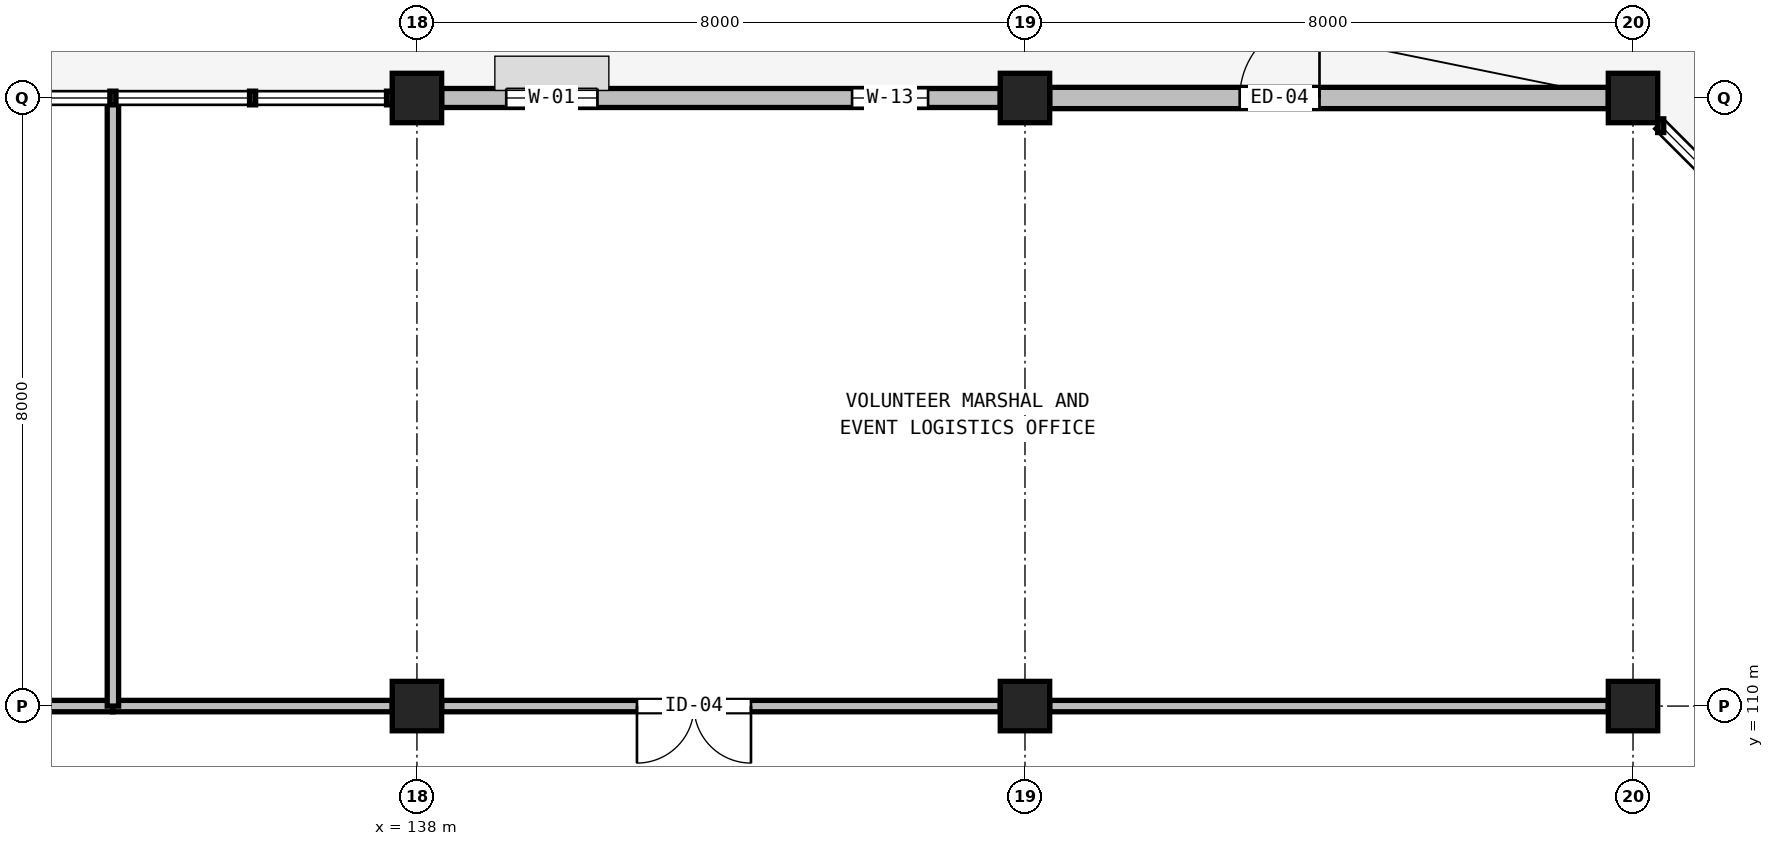
"""IFC4 building model, lengths in metres.
Left out: names, types, materials, properties, quantities, classifications, styles, units other than length and angle.
Written with IfcOpenShell. Run it as: python <this file> out.ifc"""

import sys

from ifc_helpers import new_model, si_unit, direction, frame, frame_2d, origin, origin_2d, place, context, subcontext, project, spatial, rectangle, circle, extrude, element, fill, save


model = new_model("IFC4")
c1 = context("Model", 3, precision=1e-05, world=origin(), true_north=direction((0.0, 1.0)))
c2 = subcontext(c1, "Body", "Model", "MODEL_VIEW")
j1 = project(units=[si_unit("LENGTHUNIT", "METRE"), si_unit("PLANEANGLEUNIT", "RADIAN")], contexts=[c1])
p1 = place(None, origin())
s1 = spatial("IfcSite", under=j1, at=p1, CompositionType="ELEMENT")
p2 = place(p1, origin())
s2 = spatial("IfcBuilding", under=s1, at=p2, CompositionType="ELEMENT")
p3 = place(p2, origin())
s3 = spatial("IfcBuildingStorey", under=s2, at=p3, CompositionType="ELEMENT", Elevation=0.0)
for number, where, z_axis, x_axis in (
    (1, (138.0, 110.0, 0.0), (0.0, 0.0, 1.0), (1.0, 0.0, 0.0)),
    (2, (138.0, 118.0, 0.0), (0.0, 0.0, 1.0), (1.0, 0.0, 0.0)),
    (3, (146.0, 110.0, 0.0), (0.0, 0.0, 1.0), (1.0, 0.0, 0.0)),
    (4, (146.0, 118.0, 0.0), (0.0, 0.0, 1.0), (1.0, 0.0, 0.0)),
    (5, (154.0, 110.0, 0.0), (0.0, 0.0, 1.0), (1.0, 0.0, 0.0)),
    (6, (154.0, 118.0, 0.0), (0.0, 0.0, 1.0), (1.0, 0.0, 0.0)),
):
    element("IfcColumn", number, at=place(p3, frame(where, z_axis=z_axis, x_axis=x_axis)), inside=s3, PredefinedType="COLUMN", context=c2, shape_type="SweptSolid", body=[
        extrude(circle(Radius=0.325, at=origin_2d()), origin(), (0.0, 0.0, 1.0), 5.4),
    ])
p4 = place(p3, frame((138.325, 118.0, 0.0), z_axis=(0.0, 0.0, 1.0), x_axis=(1.0, 0.0, 0.0)))
e7 = element("IfcWall", 7, at=p4, inside=s3, PredefinedType="SOLIDWALL", context=c2, shape_type="SweptSolid", body=[
    extrude(rectangle(XDim=7.35, YDim=0.25, at=frame_2d((3.675, 0.0))), origin(), (0.0, 0.0, 1.0), 4.24),
])
p5 = place(p4, frame((0.85, 0.0, 0.9)))
e8 = element("IfcOpeningElement", 8, at=p5, cuts=e7, PredefinedType="OPENING", context=c2, shape_type="SweptSolid", body=[
    extrude(rectangle(XDim=1.2, YDim=1.8, at=frame_2d((0.6, 0.9))), frame((0.0, 0.135, 0.0), z_axis=(0.0, -1.0, 0.0), x_axis=(1.0, 0.0, 0.0)), (0.0, 0.0, 1.0), 0.27),
])
p6 = place(p4, frame((5.4, 0.0, 0.9)))
e9 = element("IfcOpeningElement", 9, at=p6, cuts=e7, PredefinedType="OPENING", context=c2, shape_type="SweptSolid", body=[
    extrude(rectangle(XDim=1.0, YDim=2.1, at=frame_2d((0.5, 1.05))), frame((0.0, 0.135, 0.0), z_axis=(0.0, -1.0, 0.0), x_axis=(1.0, 0.0, 0.0)), (0.0, 0.0, 1.0), 0.27),
])
p7 = place(p3, frame((146.325, 118.0, 0.0), z_axis=(0.0, 0.0, 1.0), x_axis=(1.0, 0.0, 0.0)))
e10 = element("IfcWall", 10, at=p7, inside=s3, PredefinedType="SOLIDWALL", context=c2, shape_type="SweptSolid", body=[
    extrude(rectangle(XDim=7.35, YDim=0.28, at=frame_2d((3.675, 0.0))), origin(), (0.0, 0.0, 1.0), 4.24),
])
p8 = place(p7, frame((2.5, 0.0, 0.0)))
e11 = element("IfcOpeningElement", 11, at=p8, cuts=e10, PredefinedType="OPENING", context=c2, shape_type="SweptSolid", body=[
    extrude(rectangle(XDim=1.05, YDim=2.2, at=frame_2d((0.525, 1.1))), frame((0.0, 0.15, 0.0), z_axis=(0.0, -1.0, 0.0), x_axis=(1.0, 0.0, 0.0)), (0.0, 0.0, 1.0), 0.3),
])
for number, where, z_axis, x_axis in (
    (12, (130.325, 110.0, 0.0), (0.0, 0.0, 1.0), (1.0, 0.0, 0.0)),
    (13, (134.0, 110.0, 0.0), (0.0, 0.0, 1.0), (1.0, 0.0, 0.0)),
):
    element("IfcWall", number, at=place(p3, frame(where, z_axis=z_axis, x_axis=x_axis)), inside=s3, PredefinedType="PARTITIONING", context=c2, shape_type="SweptSolid", body=[
        extrude(rectangle(XDim=3.675, YDim=0.15, at=frame_2d((1.837, 0.0))), origin(), (0.0, 0.0, 1.0), 4.44),
    ])
p9 = place(p3, frame((138.325, 110.0, 0.0), z_axis=(0.0, 0.0, 1.0), x_axis=(1.0, 0.0, 0.0)))
e14 = element("IfcWall", 14, at=p9, inside=s3, PredefinedType="PARTITIONING", context=c2, shape_type="SweptSolid", body=[
    extrude(rectangle(XDim=7.35, YDim=0.15, at=frame_2d((3.675, 0.0))), origin(), (0.0, 0.0, 1.0), 4.39),
])
p10 = place(p9, frame((2.57, 0.0, 0.0)))
e15 = element("IfcOpeningElement", 15, at=p10, cuts=e14, PredefinedType="OPENING", context=c2, shape_type="SweptSolid", body=[
    extrude(rectangle(XDim=1.5, YDim=2.2, at=frame_2d((0.75, 1.1))), frame((0.0, 0.085, 0.0), z_axis=(0.0, -1.0, 0.0), x_axis=(1.0, 0.0, 0.0)), (0.0, 0.0, 1.0), 0.17),
])
p11 = place(p3, frame((146.325, 110.0, 0.0), z_axis=(0.0, 0.0, 1.0), x_axis=(1.0, 0.0, 0.0)))
e16 = element("IfcWall", 16, at=p11, inside=s3, PredefinedType="PARTITIONING", context=c2, shape_type="SweptSolid", body=[
    extrude(rectangle(XDim=7.35, YDim=0.15, at=frame_2d((3.675, 0.0))), origin(), (0.0, 0.0, 1.0), 4.34),
])
p12 = place(p3, frame((134.0, 110.0, 0.0), z_axis=(0.0, 0.0, 1.0), x_axis=(0.0, 1.0, 0.0)))
e17 = element("IfcWall", 17, at=p12, inside=s3, PredefinedType="PARTITIONING", context=c2, shape_type="SweptSolid", body=[
    extrude(rectangle(XDim=8.0, YDim=0.15, at=frame_2d((4.0, 0.0))), origin(), (0.0, 0.0, 1.0), 5.1),
])
p13 = place(p5, origin())
e18 = element("IfcWindow", 18, at=p13, inside=s3, PartitioningType="SINGLE_PANEL", PredefinedType="WINDOW", context=c2, shape_type="SweptSolid", body=[
    extrude(rectangle(XDim=1.2, YDim=1.8, at=frame_2d((0.6, 0.9))), frame((0.0, 0.03, 0.0), z_axis=(0.0, -1.0, 0.0), x_axis=(1.0, 0.0, 0.0)), (0.0, 0.0, 1.0), 0.06),
])
fill(e8, e18)
p14 = place(p6, origin())
e19 = element("IfcWindow", 19, at=p14, inside=s3, PartitioningType="SINGLE_PANEL", PredefinedType="WINDOW", context=c2, shape_type="SweptSolid", body=[
    extrude(rectangle(XDim=1.0, YDim=2.1, at=frame_2d((0.5, 1.05))), frame((0.0, 0.03, 0.0), z_axis=(0.0, -1.0, 0.0), x_axis=(1.0, 0.0, 0.0)), (0.0, 0.0, 1.0), 0.06),
])
fill(e9, e19)
p15 = place(p8, origin())
e20 = element("IfcDoor", 20, at=p15, inside=s3, OperationType="SINGLE_SWING_RIGHT", PredefinedType="DOOR", context=c2, shape_type="SweptSolid", body=[
    extrude(rectangle(XDim=1.05, YDim=2.2, at=frame_2d((0.525, 1.1))), frame((0.0, 0.025, 0.0), z_axis=(0.0, -1.0, 0.0), x_axis=(1.0, 0.0, 0.0)), (0.0, 0.0, 1.0), 0.05),
])
fill(e11, e20)
p16 = place(p10, frame((1.5, 0.0, 0.0), z_axis=(0.0, 0.0, 1.0), x_axis=(-1.0, 0.0, 0.0)))
e21 = element("IfcDoor", 21, at=p16, inside=s3, OperationType="DOUBLE_DOOR_SINGLE_SWING", PredefinedType="DOOR", context=c2, shape_type="SweptSolid", body=[
    extrude(rectangle(XDim=1.5, YDim=2.2, at=frame_2d((0.75, 1.1))), frame((0.0, 0.025, 0.0), z_axis=(0.0, -1.0, 0.0), x_axis=(1.0, 0.0, 0.0)), (0.0, 0.0, 1.0), 0.05),
])
fill(e15, e21)
save(model, sys.argv[1])
